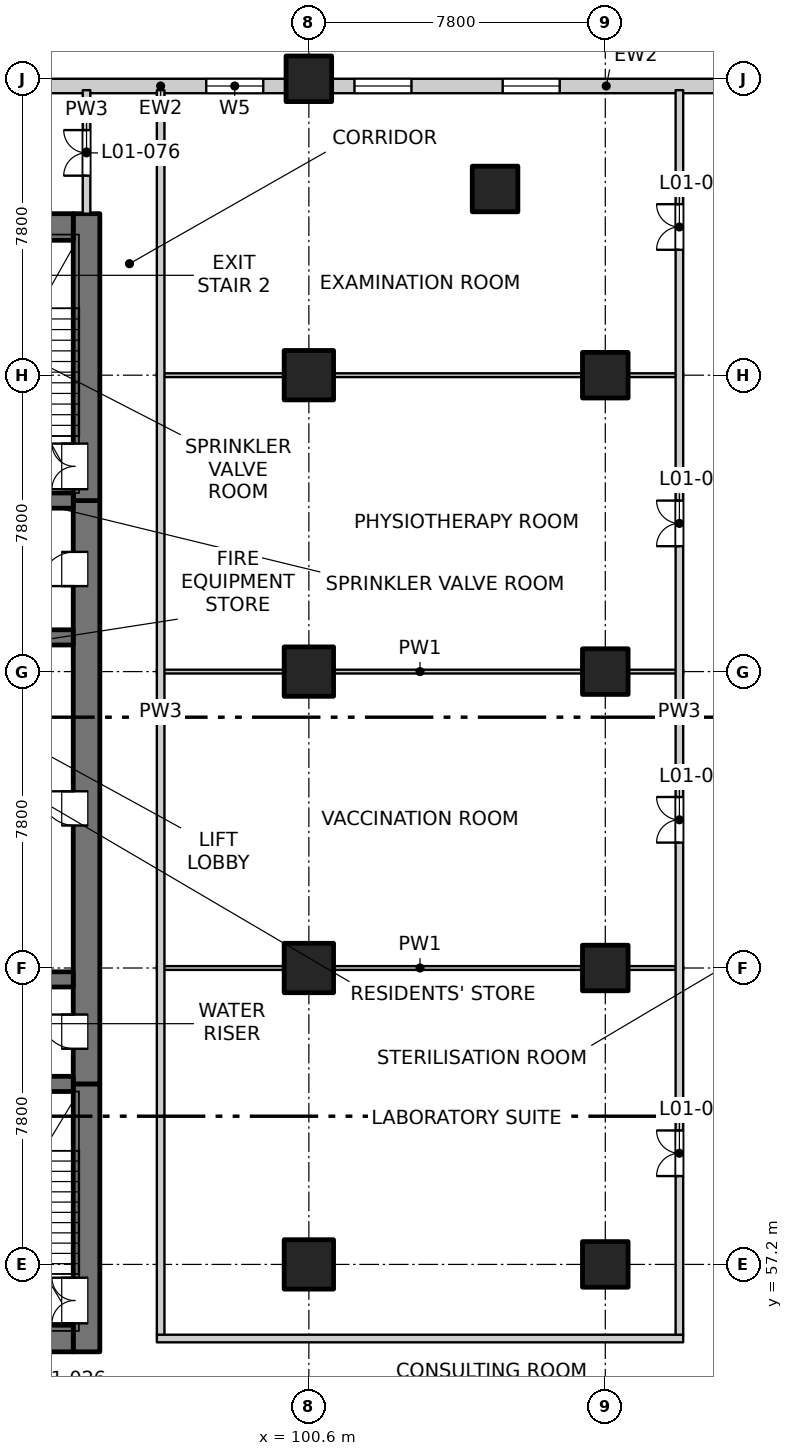
"""IFC4 building model, lengths in metres.
Left out: names, types, materials, properties, quantities, classifications, styles, units other than length and angle.
Written with IfcOpenShell. Run it as: python <this file> out.ifc"""

import sys

from ifc_helpers import new_model, si_unit, direction, frame, frame_2d, origin, origin_2d, place, context, subcontext, project, spatial, rectangle, extrude, element, fill, save


model = new_model("IFC4")
c1 = context("Model", 3, precision=1e-05, world=origin(), true_north=direction((0.0, 1.0)))
c2 = subcontext(c1, "Body", "Model", "MODEL_VIEW")
j1 = project(units=[si_unit("LENGTHUNIT", "METRE"), si_unit("PLANEANGLEUNIT", "RADIAN")], contexts=[c1])
p1 = place(None, origin())
s1 = spatial("IfcSite", under=j1, at=p1, CompositionType="ELEMENT")
p2 = place(p1, origin())
s2 = spatial("IfcBuilding", under=s1, at=p2, CompositionType="ELEMENT")
p3 = place(p2, frame((0.0, 0.0, 6.0)))
s3 = spatial("IfcBuildingStorey", under=s2, at=p3, CompositionType="ELEMENT", Elevation=6.0)
for number, where, z_axis, x_axis in (
    (1, (105.5, 85.5, -0.3), (0.0, 0.0, 1.0), (1.0, 0.0, 0.0)),
    (2, (108.4, 57.2, -0.3), (0.0, 0.0, 1.0), (1.0, 0.0, 0.0)),
    (3, (108.4, 65.0, -0.3), (0.0, 0.0, 1.0), (1.0, 0.0, 0.0)),
    (4, (108.4, 72.8, -0.3), (0.0, 0.0, 1.0), (1.0, 0.0, 0.0)),
    (5, (108.4, 80.6, -0.3), (0.0, 0.0, 1.0), (1.0, 0.0, 0.0)),
    (6, (100.6, 88.4, -0.3), (0.0, 0.0, 1.0), (1.0, 0.0, 0.0)),
):
    element("IfcColumn", number, at=place(p3, frame(where, z_axis=z_axis, x_axis=x_axis)), inside=s3, PredefinedType="COLUMN", context=c2, shape_type="SweptSolid", body=[
        extrude(rectangle(XDim=1.2, YDim=1.2, at=origin_2d()), origin(), (0.0, 0.0, 1.0), 4.5),
    ])
for number, where, z_axis, x_axis in (
    (7, (100.6, 57.2, -0.3), (0.0, 0.0, 1.0), (1.0, 0.0, 0.0)),
    (8, (100.6, 65.0, -0.3), (0.0, 0.0, 1.0), (1.0, 0.0, 0.0)),
    (9, (100.6, 72.8, -0.3), (0.0, 0.0, 1.0), (1.0, 0.0, 0.0)),
    (10, (100.6, 80.6, -0.3), (0.0, 0.0, 1.0), (1.0, 0.0, 0.0)),
):
    element("IfcColumn", number, at=place(p3, frame(where, z_axis=z_axis, x_axis=x_axis)), inside=s3, PredefinedType="COLUMN", context=c2, shape_type="SweptSolid", body=[
        extrude(rectangle(XDim=1.3, YDim=1.3, at=origin_2d()), origin(), (0.0, 0.0, 1.0), 4.5),
    ])
p4 = place(p3, frame((94.75, 54.9, -0.3), z_axis=(0.0, 0.0, 1.0), x_axis=(0.0, 1.0, 0.0)))
e11 = element("IfcWall", 11, at=p4, inside=s3, PredefinedType="SOLIDWALL", context=c2, shape_type="SweptSolid", body=[
    extrude(rectangle(XDim=7.05, YDim=0.7, at=frame_2d((3.525, 0.0))), origin(), (0.0, 0.0, 1.0), 4.5),
])
p5 = place(p4, frame((0.75, 0.0, 0.3)))
e12 = element("IfcOpeningElement", 12, at=p5, cuts=e11, PredefinedType="OPENING", context=c2, shape_type="SweptSolid", body=[
    extrude(rectangle(XDim=1.2, YDim=2.1, at=frame_2d((0.6, 1.05))), frame((0.0, 0.36, 0.0), z_axis=(0.0, -1.0, 0.0), x_axis=(1.0, 0.0, 0.0)), (0.0, 0.0, 1.0), 0.72),
])
p6 = place(p3, frame((94.75, 61.95, -0.3), z_axis=(0.0, 0.0, 1.0), x_axis=(0.0, 1.0, 0.0)))
e13 = element("IfcWall", 13, at=p6, inside=s3, PredefinedType="SOLIDWALL", context=c2, shape_type="SweptSolid", body=[
    extrude(rectangle(XDim=15.35, YDim=0.7, at=frame_2d((7.675, 0.0))), origin(), (0.0, 0.0, 1.0), 4.5),
])
p7 = place(p6, frame((0.925, 0.0, 0.3)))
e14 = element("IfcOpeningElement", 14, at=p7, cuts=e13, PredefinedType="OPENING", context=c2, shape_type="SweptSolid", body=[
    extrude(rectangle(XDim=0.9, YDim=2.1, at=frame_2d((0.45, 1.05))), frame((0.0, 0.36, 0.0), z_axis=(0.0, -1.0, 0.0), x_axis=(1.0, 0.0, 0.0)), (0.0, 0.0, 1.0), 0.72),
])
p8 = place(p6, frame((6.8, 0.0, 0.3)))
e15 = element("IfcOpeningElement", 15, at=p8, cuts=e13, PredefinedType="OPENING", context=c2, shape_type="SweptSolid", body=[
    extrude(rectangle(XDim=0.9, YDim=2.1, at=frame_2d((0.45, 1.05))), frame((0.0, 0.36, 0.0), z_axis=(0.0, -1.0, 0.0), x_axis=(1.0, 0.0, 0.0)), (0.0, 0.0, 1.0), 0.72),
])
p9 = place(p6, frame((13.1, 0.0, 0.3)))
e16 = element("IfcOpeningElement", 16, at=p9, cuts=e13, PredefinedType="OPENING", context=c2, shape_type="SweptSolid", body=[
    extrude(rectangle(XDim=0.9, YDim=2.1, at=frame_2d((0.45, 1.05))), frame((0.0, 0.36, 0.0), z_axis=(0.0, -1.0, 0.0), x_axis=(1.0, 0.0, 0.0)), (0.0, 0.0, 1.0), 0.72),
])
p10 = place(p3, frame((94.75, 77.3, -0.3), z_axis=(0.0, 0.0, 1.0), x_axis=(0.0, 1.0, 0.0)))
e17 = element("IfcWall", 17, at=p10, inside=s3, PredefinedType="SOLIDWALL", context=c2, shape_type="SweptSolid", body=[
    extrude(rectangle(XDim=7.55, YDim=0.7, at=frame_2d((3.775, 0.0))), origin(), (0.0, 0.0, 1.0), 4.5),
])
p11 = place(p10, frame((0.3, 0.0, 0.3)))
e18 = element("IfcOpeningElement", 18, at=p11, cuts=e17, PredefinedType="OPENING", context=c2, shape_type="SweptSolid", body=[
    extrude(rectangle(XDim=1.2, YDim=2.1, at=frame_2d((0.6, 1.05))), frame((0.0, 0.36, 0.0), z_axis=(0.0, -1.0, 0.0), x_axis=(1.0, 0.0, 0.0)), (0.0, 0.0, 1.0), 0.72),
])
p12 = place(p3, frame((75.6, 55.25, -0.3), z_axis=(0.0, 0.0, 1.0), x_axis=(1.0, 0.0, 0.0)))
e19 = element("IfcWall", 19, at=p12, inside=s3, PredefinedType="SOLIDWALL", context=c2, shape_type="SweptSolid", body=[
    extrude(rectangle(XDim=18.8, YDim=0.7, at=frame_2d((9.4, 0.0))), origin(), (0.0, 0.0, 1.0), 4.5),
])
p13 = place(p12, frame((8.65, 0.0, 0.3)))
e20 = element("IfcOpeningElement", 20, at=p13, cuts=e19, PredefinedType="OPENING", context=c2, shape_type="SweptSolid", body=[
    extrude(rectangle(XDim=1.5, YDim=2.1, at=frame_2d((0.75, 1.05))), frame((0.0, 0.36, 0.0), z_axis=(0.0, -1.0, 0.0), x_axis=(1.0, 0.0, 0.0)), (0.0, 0.0, 1.0), 0.72),
])
p14 = place(p3, frame((75.6, 84.5, -0.3), z_axis=(0.0, 0.0, 1.0), x_axis=(1.0, 0.0, 0.0)))
e21 = element("IfcWall", 21, at=p14, inside=s3, PredefinedType="SOLIDWALL", context=c2, shape_type="SweptSolid", body=[
    extrude(rectangle(XDim=18.8, YDim=0.7, at=frame_2d((9.4, 0.0))), origin(), (0.0, 0.0, 1.0), 4.5),
])
for number, where, z_axis, x_axis in (
    (22, (90.75, 61.95, -0.3), (0.0, 0.0, 1.0), (1.0, 0.0, 0.0)),
    (23, (90.75, 64.7, -0.3), (0.0, 0.0, 1.0), (1.0, 0.0, 0.0)),
    (24, (90.75, 73.7, -0.3), (0.0, 0.0, 1.0), (1.0, 0.0, 0.0)),
    (25, (90.75, 77.3, -0.3), (0.0, 0.0, 1.0), (1.0, 0.0, 0.0)),
):
    element("IfcWall", number, at=place(p3, frame(where, z_axis=z_axis, x_axis=x_axis)), inside=s3, PredefinedType="SOLIDWALL", context=c2, shape_type="SweptSolid", body=[
        extrude(rectangle(XDim=3.65, YDim=0.4, at=frame_2d((1.825, 0.0))), origin(), (0.0, 0.0, 1.0), 4.5),
    ])
p15 = place(p3, frame((93.4, 88.21, 0.0), z_axis=(0.0, 0.0, 1.0), x_axis=(1.0, 0.0, 0.0)))
e26 = element("IfcWall", 26, at=p15, inside=s3, PredefinedType="SOLIDWALL", context=c2, shape_type="SweptSolid", body=[
    extrude(rectangle(XDim=6.6, YDim=0.38, at=frame_2d((3.3, 0.0))), origin(), (0.0, 0.0, 1.0), 4.2),
])
p16 = place(p15, frame((4.5, 0.0, 0.9)))
e27 = element("IfcOpeningElement", 27, at=p16, cuts=e26, PredefinedType="OPENING", context=c2, shape_type="SweptSolid", body=[
    extrude(rectangle(XDim=1.5, YDim=1.5, at=frame_2d((0.75, 0.75))), frame((0.0, 0.2, 0.0), z_axis=(0.0, -1.0, 0.0), x_axis=(1.0, 0.0, 0.0)), (0.0, 0.0, 1.0), 0.4),
])
p17 = place(p3, frame((101.2, 88.21, 0.0), z_axis=(0.0, 0.0, 1.0), x_axis=(1.0, 0.0, 0.0)))
e28 = element("IfcWall", 28, at=p17, inside=s3, PredefinedType="SOLIDWALL", context=c2, shape_type="SweptSolid", body=[
    extrude(rectangle(XDim=14.45, YDim=0.38, at=frame_2d((7.225, 0.0))), origin(), (0.0, 0.0, 1.0), 4.2),
])
p18 = place(p17, frame((0.6, 0.0, 0.9)))
e29 = element("IfcOpeningElement", 29, at=p18, cuts=e28, PredefinedType="OPENING", context=c2, shape_type="SweptSolid", body=[
    extrude(rectangle(XDim=1.5, YDim=1.5, at=frame_2d((0.75, 0.75))), frame((0.0, 0.2, 0.0), z_axis=(0.0, -1.0, 0.0), x_axis=(1.0, 0.0, 0.0)), (0.0, 0.0, 1.0), 0.4),
])
p19 = place(p17, frame((4.5, 0.0, 0.9)))
e30 = element("IfcOpeningElement", 30, at=p19, cuts=e28, PredefinedType="OPENING", context=c2, shape_type="SweptSolid", body=[
    extrude(rectangle(XDim=1.5, YDim=1.5, at=frame_2d((0.75, 0.75))), frame((0.0, 0.2, 0.0), z_axis=(0.0, -1.0, 0.0), x_axis=(1.0, 0.0, 0.0)), (0.0, 0.0, 1.0), 0.4),
])
p20 = place(p17, frame((12.3, 0.0, 0.9)))
e31 = element("IfcOpeningElement", 31, at=p20, cuts=e28, PredefinedType="OPENING", context=c2, shape_type="SweptSolid", body=[
    extrude(rectangle(XDim=1.5, YDim=1.5, at=frame_2d((0.75, 0.75))), frame((0.0, 0.2, 0.0), z_axis=(0.0, -1.0, 0.0), x_axis=(1.0, 0.0, 0.0)), (0.0, 0.0, 1.0), 0.4),
])
p21 = place(p3, frame((96.6, 55.25, 0.0), z_axis=(0.0, 0.0, 1.0), x_axis=(1.0, 0.0, 0.0)))
e32 = element("IfcWall", 32, at=p21, inside=s3, PredefinedType="PARTITIONING", context=c2, shape_type="SweptSolid", body=[
    extrude(rectangle(XDim=13.85, YDim=0.2, at=frame_2d((6.925, 0.0))), origin(), (0.0, 0.0, 1.0), 4.2),
])
for number, where, z_axis, x_axis in (
    (33, (96.6, 65.0, 0.0), (0.0, 0.0, 1.0), (1.0, 0.0, 0.0)),
    (34, (96.6, 72.8, 0.0), (0.0, 0.0, 1.0), (1.0, 0.0, 0.0)),
    (35, (96.6, 80.6, 0.0), (0.0, 0.0, 1.0), (1.0, 0.0, 0.0)),
):
    element("IfcWall", number, at=place(p3, frame(where, z_axis=z_axis, x_axis=x_axis)), inside=s3, PredefinedType="PARTITIONING", context=c2, shape_type="SweptSolid", body=[
        extrude(rectangle(XDim=13.85, YDim=0.1, at=frame_2d((6.925, 0.0))), origin(), (0.0, 0.0, 1.0), 4.2),
    ])
p22 = place(p3, frame((94.75, 84.85, 0.0), z_axis=(0.0, 0.0, 1.0), x_axis=(0.0, 1.0, 0.0)))
e36 = element("IfcWall", 36, at=p22, inside=s3, PredefinedType="PARTITIONING", context=c2, shape_type="SweptSolid", body=[
    extrude(rectangle(XDim=3.25, YDim=0.2, at=frame_2d((1.625, 0.0))), origin(), (0.0, 0.0, 1.0), 4.2),
])
p23 = place(p22, frame((1.0, 0.0, 0.0)))
e37 = element("IfcOpeningElement", 37, at=p23, cuts=e36, PredefinedType="OPENING", context=c2, shape_type="SweptSolid", body=[
    extrude(rectangle(XDim=1.2, YDim=2.1, at=frame_2d((0.6, 1.05))), frame((0.0, 0.11, 0.0), z_axis=(0.0, -1.0, 0.0), x_axis=(1.0, 0.0, 0.0)), (0.0, 0.0, 1.0), 0.22),
])
p24 = place(p3, frame((96.7, 55.35, 0.0), z_axis=(0.0, 0.0, 1.0), x_axis=(0.0, 1.0, 0.0)))
e38 = element("IfcWall", 38, at=p24, inside=s3, PredefinedType="PARTITIONING", context=c2, shape_type="SweptSolid", body=[
    extrude(rectangle(XDim=32.75, YDim=0.2, at=frame_2d((16.375, 0.0))), origin(), (0.0, 0.0, 1.0), 4.2),
])
p25 = place(p3, frame((110.35, 55.35, 0.0), z_axis=(0.0, 0.0, 1.0), x_axis=(0.0, 1.0, 0.0)))
e39 = element("IfcWall", 39, at=p25, inside=s3, PredefinedType="PARTITIONING", context=c2, shape_type="SweptSolid", body=[
    extrude(rectangle(XDim=32.75, YDim=0.2, at=frame_2d((16.375, 0.0))), origin(), (0.0, 0.0, 1.0), 4.2),
])
p26 = place(p25, frame((4.175, 0.0, 0.0)))
e40 = element("IfcOpeningElement", 40, at=p26, cuts=e39, PredefinedType="OPENING", context=c2, shape_type="SweptSolid", body=[
    extrude(rectangle(XDim=1.2, YDim=2.1, at=frame_2d((0.6, 1.05))), frame((0.0, 0.11, 0.0), z_axis=(0.0, -1.0, 0.0), x_axis=(1.0, 0.0, 0.0)), (0.0, 0.0, 1.0), 0.22),
])
p27 = place(p25, frame((12.95, 0.0, 0.0)))
e41 = element("IfcOpeningElement", 41, at=p27, cuts=e39, PredefinedType="OPENING", context=c2, shape_type="SweptSolid", body=[
    extrude(rectangle(XDim=1.2, YDim=2.1, at=frame_2d((0.6, 1.05))), frame((0.0, 0.11, 0.0), z_axis=(0.0, -1.0, 0.0), x_axis=(1.0, 0.0, 0.0)), (0.0, 0.0, 1.0), 0.22),
])
p28 = place(p25, frame((20.75, 0.0, 0.0)))
e42 = element("IfcOpeningElement", 42, at=p28, cuts=e39, PredefinedType="OPENING", context=c2, shape_type="SweptSolid", body=[
    extrude(rectangle(XDim=1.2, YDim=2.1, at=frame_2d((0.6, 1.05))), frame((0.0, 0.11, 0.0), z_axis=(0.0, -1.0, 0.0), x_axis=(1.0, 0.0, 0.0)), (0.0, 0.0, 1.0), 0.22),
])
p29 = place(p25, frame((28.55, 0.0, 0.0)))
e43 = element("IfcOpeningElement", 43, at=p29, cuts=e39, PredefinedType="OPENING", context=c2, shape_type="SweptSolid", body=[
    extrude(rectangle(XDim=1.2, YDim=2.1, at=frame_2d((0.6, 1.05))), frame((0.0, 0.11, 0.0), z_axis=(0.0, -1.0, 0.0), x_axis=(1.0, 0.0, 0.0)), (0.0, 0.0, 1.0), 0.22),
])
p30 = place(p16, origin())
e44 = element("IfcWindow", 44, at=p30, inside=s3, PartitioningType="SINGLE_PANEL", PredefinedType="WINDOW", context=c2, shape_type="SweptSolid", body=[
    extrude(rectangle(XDim=1.5, YDim=1.5, at=frame_2d((0.75, 0.75))), frame((0.0, 0.03, 0.0), z_axis=(0.0, -1.0, 0.0), x_axis=(1.0, 0.0, 0.0)), (0.0, 0.0, 1.0), 0.06),
])
fill(e27, e44)
p31 = place(p18, origin())
e45 = element("IfcWindow", 45, at=p31, inside=s3, PartitioningType="SINGLE_PANEL", PredefinedType="WINDOW", context=c2, shape_type="SweptSolid", body=[
    extrude(rectangle(XDim=1.5, YDim=1.5, at=frame_2d((0.75, 0.75))), frame((0.0, 0.03, 0.0), z_axis=(0.0, -1.0, 0.0), x_axis=(1.0, 0.0, 0.0)), (0.0, 0.0, 1.0), 0.06),
])
fill(e29, e45)
p32 = place(p19, origin())
e46 = element("IfcWindow", 46, at=p32, inside=s3, PartitioningType="SINGLE_PANEL", PredefinedType="WINDOW", context=c2, shape_type="SweptSolid", body=[
    extrude(rectangle(XDim=1.5, YDim=1.5, at=frame_2d((0.75, 0.75))), frame((0.0, 0.03, 0.0), z_axis=(0.0, -1.0, 0.0), x_axis=(1.0, 0.0, 0.0)), (0.0, 0.0, 1.0), 0.06),
])
fill(e30, e46)
p33 = place(p5, origin())
e47 = element("IfcDoor", 47, at=p33, inside=s3, OperationType="DOUBLE_DOOR_SINGLE_SWING", PredefinedType="DOOR", context=c2, shape_type="SweptSolid", body=[
    extrude(rectangle(XDim=1.2, YDim=2.1, at=frame_2d((0.6, 1.05))), frame((0.0, 0.335, 0.0), z_axis=(0.0, -1.0, 0.0), x_axis=(1.0, 0.0, 0.0)), (0.0, 0.0, 1.0), 0.05),
])
fill(e12, e47)
p34 = place(p26, origin())
e48 = element("IfcDoor", 48, at=p34, inside=s3, OperationType="DOUBLE_DOOR_SINGLE_SWING", PredefinedType="DOOR", context=c2, shape_type="SweptSolid", body=[
    extrude(rectangle(XDim=1.2, YDim=2.1, at=frame_2d((0.6, 1.05))), frame((0.0, 0.025, 0.0), z_axis=(0.0, -1.0, 0.0), x_axis=(1.0, 0.0, 0.0)), (0.0, 0.0, 1.0), 0.05),
])
fill(e40, e48)
p35 = place(p7, origin())
e49 = element("IfcDoor", 49, at=p35, inside=s3, OperationType="SINGLE_SWING_RIGHT", PredefinedType="DOOR", context=c2, shape_type="SweptSolid", body=[
    extrude(rectangle(XDim=0.9, YDim=2.1, at=frame_2d((0.45, 1.05))), frame((0.0, 0.335, 0.0), z_axis=(0.0, -1.0, 0.0), x_axis=(1.0, 0.0, 0.0)), (0.0, 0.0, 1.0), 0.05),
])
fill(e14, e49)
p36 = place(p27, origin())
e50 = element("IfcDoor", 50, at=p36, inside=s3, OperationType="DOUBLE_DOOR_SINGLE_SWING", PredefinedType="DOOR", context=c2, shape_type="SweptSolid", body=[
    extrude(rectangle(XDim=1.2, YDim=2.1, at=frame_2d((0.6, 1.05))), frame((0.0, 0.025, 0.0), z_axis=(0.0, -1.0, 0.0), x_axis=(1.0, 0.0, 0.0)), (0.0, 0.0, 1.0), 0.05),
])
fill(e41, e50)
p37 = place(p8, origin())
e51 = element("IfcDoor", 51, at=p37, inside=s3, OperationType="SINGLE_SWING_RIGHT", PredefinedType="DOOR", context=c2, shape_type="SweptSolid", body=[
    extrude(rectangle(XDim=0.9, YDim=2.1, at=frame_2d((0.45, 1.05))), frame((0.0, 0.335, 0.0), z_axis=(0.0, -1.0, 0.0), x_axis=(1.0, 0.0, 0.0)), (0.0, 0.0, 1.0), 0.05),
])
fill(e15, e51)
p38 = place(p9, origin())
e52 = element("IfcDoor", 52, at=p38, inside=s3, OperationType="SINGLE_SWING_LEFT", PredefinedType="DOOR", context=c2, shape_type="SweptSolid", body=[
    extrude(rectangle(XDim=0.9, YDim=2.1, at=frame_2d((0.45, 1.05))), frame((0.0, 0.335, 0.0), z_axis=(0.0, -1.0, 0.0), x_axis=(1.0, 0.0, 0.0)), (0.0, 0.0, 1.0), 0.05),
])
fill(e16, e52)
p39 = place(p28, origin())
e53 = element("IfcDoor", 53, at=p39, inside=s3, OperationType="DOUBLE_DOOR_SINGLE_SWING", PredefinedType="DOOR", context=c2, shape_type="SweptSolid", body=[
    extrude(rectangle(XDim=1.2, YDim=2.1, at=frame_2d((0.6, 1.05))), frame((0.0, 0.025, 0.0), z_axis=(0.0, -1.0, 0.0), x_axis=(1.0, 0.0, 0.0)), (0.0, 0.0, 1.0), 0.05),
])
fill(e42, e53)
p40 = place(p11, origin())
e54 = element("IfcDoor", 54, at=p40, inside=s3, OperationType="DOUBLE_DOOR_SINGLE_SWING", PredefinedType="DOOR", context=c2, shape_type="SweptSolid", body=[
    extrude(rectangle(XDim=1.2, YDim=2.1, at=frame_2d((0.6, 1.05))), frame((0.0, 0.335, 0.0), z_axis=(0.0, -1.0, 0.0), x_axis=(1.0, 0.0, 0.0)), (0.0, 0.0, 1.0), 0.05),
])
fill(e18, e54)
p41 = place(p29, origin())
e55 = element("IfcDoor", 55, at=p41, inside=s3, OperationType="DOUBLE_DOOR_SINGLE_SWING", PredefinedType="DOOR", context=c2, shape_type="SweptSolid", body=[
    extrude(rectangle(XDim=1.2, YDim=2.1, at=frame_2d((0.6, 1.05))), frame((0.0, 0.025, 0.0), z_axis=(0.0, -1.0, 0.0), x_axis=(1.0, 0.0, 0.0)), (0.0, 0.0, 1.0), 0.05),
])
fill(e43, e55)
p42 = place(p23, origin())
e56 = element("IfcDoor", 56, at=p42, inside=s3, OperationType="DOUBLE_DOOR_SINGLE_SWING", PredefinedType="DOOR", context=c2, shape_type="SweptSolid", body=[
    extrude(rectangle(XDim=1.2, YDim=2.1, at=frame_2d((0.6, 1.05))), frame((0.0, 0.025, 0.0), z_axis=(0.0, -1.0, 0.0), x_axis=(1.0, 0.0, 0.0)), (0.0, 0.0, 1.0), 0.05),
])
fill(e37, e56)
save(model, sys.argv[1])
